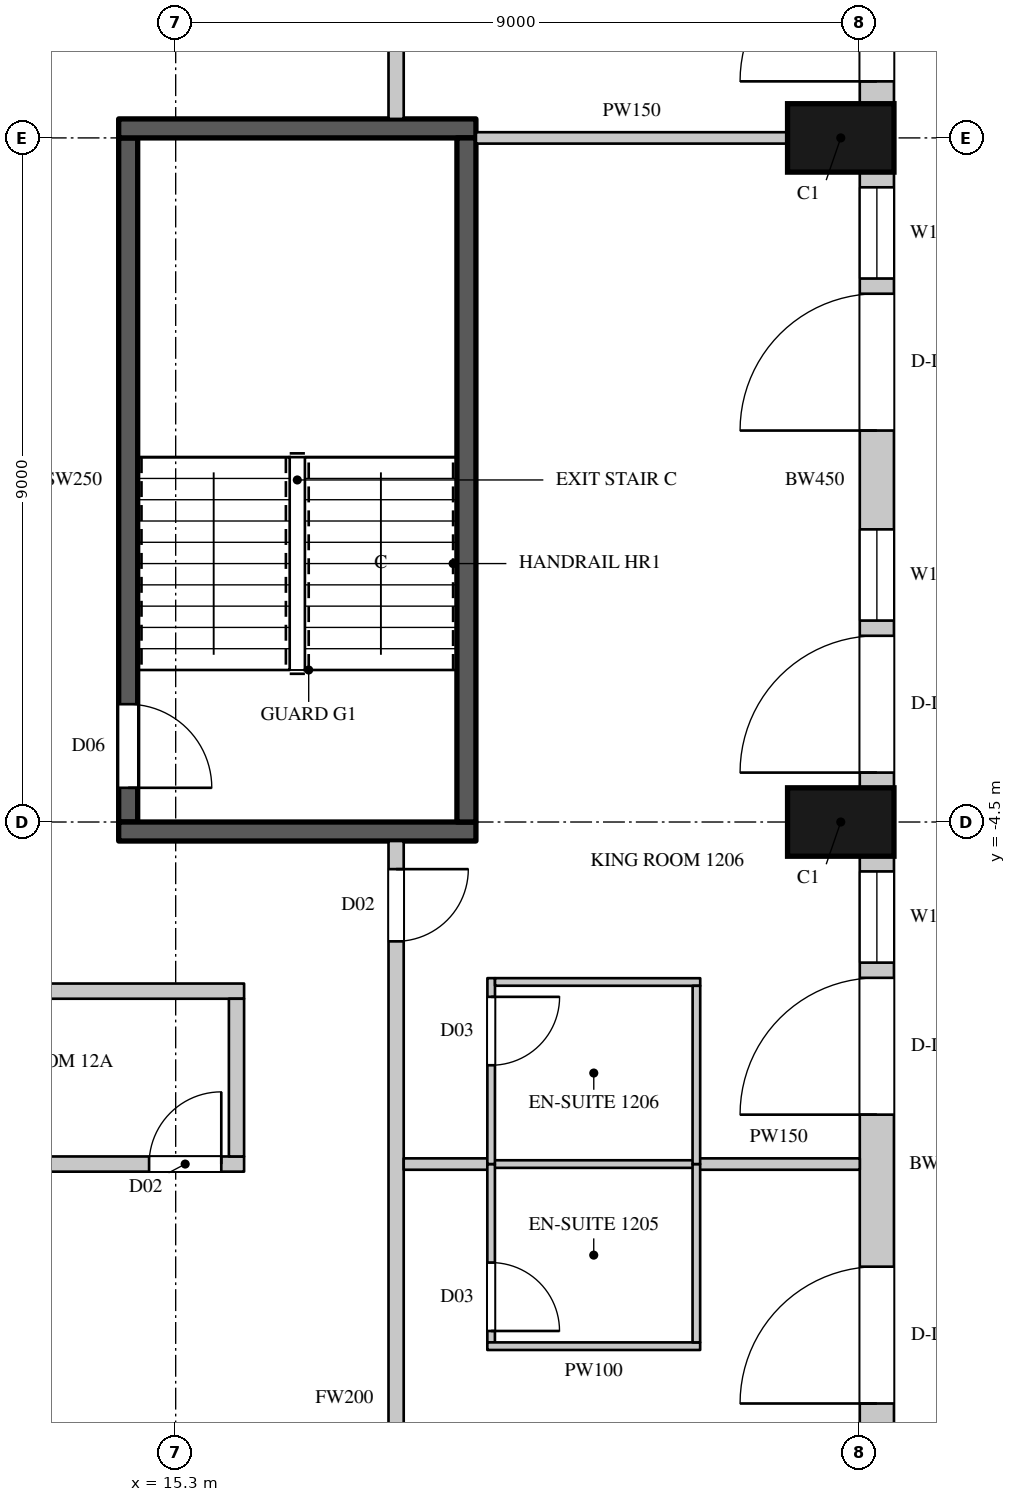
"""IFC4 building model, lengths in metres.
Left out: names, types, materials, properties, quantities, classifications, styles, units other than length and angle.
Written with IfcOpenShell. Run it as: python <this file> out.ifc"""

import sys

from ifc_helpers import new_model, si_unit, direction, frame, frame_2d, origin, origin_2d, place, context, subcontext, project, spatial, rectangle, extrude, element, fill, save


model = new_model("IFC4")
c1 = context("Model", 3, precision=1e-05, world=origin(), true_north=direction((0.0, 1.0)))
c2 = subcontext(c1, "Body", "Model", "MODEL_VIEW")
j1 = project(units=[si_unit("LENGTHUNIT", "METRE"), si_unit("PLANEANGLEUNIT", "RADIAN")], contexts=[c1])
p1 = place(None, origin())
s1 = spatial("IfcSite", under=j1, at=p1, CompositionType="ELEMENT")
p2 = place(p1, origin())
s2 = spatial("IfcBuilding", under=s1, at=p2, CompositionType="ELEMENT")
p3 = place(p2, frame((0.0, 0.0, 73.5)))
s3 = spatial("IfcBuildingStorey", under=s2, at=p3, CompositionType="ELEMENT", Elevation=73.5)
for number, where, z_axis, x_axis in (
    (1, (24.05, -4.5, 0.0), (0.0, 0.0, 1.0), (0.0, 1.0, 0.0)),
    (2, (24.05, 4.5, 0.0), (0.0, 0.0, 1.0), (0.0, 1.0, 0.0)),
):
    element("IfcColumn", number, at=place(p3, frame(where, z_axis=z_axis, x_axis=x_axis)), inside=s3, PredefinedType="COLUMN", context=c2, shape_type="SweptSolid", body=[
        extrude(rectangle(XDim=0.9, YDim=1.4, at=origin_2d()), origin(), (0.0, 0.0, 1.0), 3.6),
    ])
p4 = place(p3, frame((24.525, -13.05, 0.0), z_axis=(0.0, 0.0, 1.0), x_axis=(0.0, 1.0, 0.0)))
e3 = element("IfcWall", 3, at=p4, inside=s3, PredefinedType="SOLIDWALL", context=c2, shape_type="SweptSolid", body=[
    extrude(rectangle(XDim=8.1, YDim=0.45, at=frame_2d((4.05, 0.0))), origin(), (0.0, 0.0, 1.0), 3.3),
])
p5 = place(p4, frame((0.9, 0.0, 0.0)))
e4 = element("IfcOpeningElement", 4, at=p5, cuts=e3, PredefinedType="OPENING", context=c2, shape_type="SweptSolid", body=[
    extrude(rectangle(XDim=1.8, YDim=2.4, at=frame_2d((0.9, 1.2))), frame((0.0, 0.235, 0.0), z_axis=(0.0, -1.0, 0.0), x_axis=(1.0, 0.0, 0.0)), (0.0, 0.0, 1.0), 0.47),
])
p6 = place(p4, frame((4.7, 0.0, 0.0)))
e5 = element("IfcOpeningElement", 5, at=p6, cuts=e3, PredefinedType="OPENING", context=c2, shape_type="SweptSolid", body=[
    extrude(rectangle(XDim=1.8, YDim=2.4, at=frame_2d((0.9, 1.2))), frame((0.0, 0.235, 0.0), z_axis=(0.0, -1.0, 0.0), x_axis=(1.0, 0.0, 0.0)), (0.0, 0.0, 1.0), 0.47),
])
p7 = place(p4, frame((6.7, 0.0, 1.05)))
e6 = element("IfcOpeningElement", 6, at=p7, cuts=e3, PredefinedType="OPENING", context=c2, shape_type="SweptSolid", body=[
    extrude(rectangle(XDim=1.2, YDim=2.0, at=frame_2d((0.6, 1.0))), frame((0.0, 0.235, 0.0), z_axis=(0.0, -1.0, 0.0), x_axis=(1.0, 0.0, 0.0)), (0.0, 0.0, 1.0), 0.47),
])
p8 = place(p3, frame((24.525, -4.05, 0.0), z_axis=(0.0, 0.0, 1.0), x_axis=(0.0, 1.0, 0.0)))
e7 = element("IfcWall", 7, at=p8, inside=s3, PredefinedType="SOLIDWALL", context=c2, shape_type="SweptSolid", body=[
    extrude(rectangle(XDim=8.1, YDim=0.45, at=frame_2d((4.05, 0.0))), origin(), (0.0, 0.0, 1.0), 3.3),
])
p9 = place(p8, frame((0.2, 0.0, 0.0)))
e8 = element("IfcOpeningElement", 8, at=p9, cuts=e7, PredefinedType="OPENING", context=c2, shape_type="SweptSolid", body=[
    extrude(rectangle(XDim=1.8, YDim=2.4, at=frame_2d((0.9, 1.2))), frame((0.0, 0.235, 0.0), z_axis=(0.0, -1.0, 0.0), x_axis=(1.0, 0.0, 0.0)), (0.0, 0.0, 1.0), 0.47),
])
p10 = place(p8, frame((2.2, 0.0, 1.05)))
e9 = element("IfcOpeningElement", 9, at=p10, cuts=e7, PredefinedType="OPENING", context=c2, shape_type="SweptSolid", body=[
    extrude(rectangle(XDim=1.2, YDim=2.0, at=frame_2d((0.6, 1.0))), frame((0.0, 0.235, 0.0), z_axis=(0.0, -1.0, 0.0), x_axis=(1.0, 0.0, 0.0)), (0.0, 0.0, 1.0), 0.47),
])
p11 = place(p8, frame((4.7, 0.0, 0.0)))
e10 = element("IfcOpeningElement", 10, at=p11, cuts=e7, PredefinedType="OPENING", context=c2, shape_type="SweptSolid", body=[
    extrude(rectangle(XDim=1.8, YDim=2.4, at=frame_2d((0.9, 1.2))), frame((0.0, 0.235, 0.0), z_axis=(0.0, -1.0, 0.0), x_axis=(1.0, 0.0, 0.0)), (0.0, 0.0, 1.0), 0.47),
])
p12 = place(p8, frame((6.7, 0.0, 1.05)))
e11 = element("IfcOpeningElement", 11, at=p12, cuts=e7, PredefinedType="OPENING", context=c2, shape_type="SweptSolid", body=[
    extrude(rectangle(XDim=1.2, YDim=2.0, at=frame_2d((0.6, 1.0))), frame((0.0, 0.235, 0.0), z_axis=(0.0, -1.0, 0.0), x_axis=(1.0, 0.0, 0.0)), (0.0, 0.0, 1.0), 0.47),
])
p13 = place(p3, frame((24.525, 4.95, 0.0), z_axis=(0.0, 0.0, 1.0), x_axis=(0.0, 1.0, 0.0)))
e12 = element("IfcWall", 12, at=p13, inside=s3, PredefinedType="SOLIDWALL", context=c2, shape_type="SweptSolid", body=[
    extrude(rectangle(XDim=8.439, YDim=0.45, at=frame_2d((4.219, 0.0))), origin(), (0.0, 0.0, 1.0), 3.3),
])
p14 = place(p13, frame((0.294, 0.0, 0.0)))
e13 = element("IfcOpeningElement", 13, at=p14, cuts=e12, PredefinedType="OPENING", context=c2, shape_type="SweptSolid", body=[
    extrude(rectangle(XDim=1.8, YDim=2.4, at=frame_2d((0.9, 1.2))), frame((0.0, 0.235, 0.0), z_axis=(0.0, -1.0, 0.0), x_axis=(1.0, 0.0, 0.0)), (0.0, 0.0, 1.0), 0.47),
])
p15 = place(p13, frame((2.294, 0.0, 1.05)))
e14 = element("IfcOpeningElement", 14, at=p15, cuts=e12, PredefinedType="OPENING", context=c2, shape_type="SweptSolid", body=[
    extrude(rectangle(XDim=1.2, YDim=2.0, at=frame_2d((0.6, 1.0))), frame((0.0, 0.235, 0.0), z_axis=(0.0, -1.0, 0.0), x_axis=(1.0, 0.0, 0.0)), (0.0, 0.0, 1.0), 0.47),
])
p16 = place(p13, frame((5.232, 0.0, 1.05)))
e15 = element("IfcOpeningElement", 15, at=p16, cuts=e12, PredefinedType="OPENING", context=c2, shape_type="SweptSolid", body=[
    extrude(rectangle(XDim=2.7, YDim=2.0, at=frame_2d((1.35, 1.0))), frame((0.0, 0.235, 0.0), z_axis=(0.0, -1.0, 0.0), x_axis=(1.0, 0.0, 0.0)), (0.0, 0.0, 1.0), 0.47),
])
p17 = place(p3, frame((10.5, -9.0, 0.0), z_axis=(0.0, 0.0, 1.0), x_axis=(1.0, 0.0, 0.0)))
e16 = element("IfcWall", 16, at=p17, inside=s3, PredefinedType="PARTITIONING", context=c2, shape_type="SweptSolid", body=[
    extrude(rectangle(XDim=5.7, YDim=0.2, at=frame_2d((2.85, 0.0))), origin(), (0.0, 0.0, 1.0), 2.65),
])
p18 = place(p17, frame((4.45, 0.0, 0.0)))
e17 = element("IfcOpeningElement", 17, at=p18, cuts=e16, PredefinedType="OPENING", context=c2, shape_type="SweptSolid", body=[
    extrude(rectangle(XDim=0.95, YDim=2.2, at=frame_2d((0.475, 1.1))), frame((0.0, 0.11, 0.0), z_axis=(0.0, -1.0, 0.0), x_axis=(1.0, 0.0, 0.0)), (0.0, 0.0, 1.0), 0.22),
])
p19 = place(p3, frame((10.5, -6.725, 0.0), z_axis=(0.0, 0.0, 1.0), x_axis=(1.0, 0.0, 0.0)))
e18 = element("IfcWall", 18, at=p19, inside=s3, PredefinedType="PARTITIONING", context=c2, shape_type="SweptSolid", body=[
    extrude(rectangle(XDim=5.7, YDim=0.2, at=frame_2d((2.85, 0.0))), origin(), (0.0, 0.0, 1.0), 3.3),
])
p20 = place(p3, frame((16.1, -8.9, 0.0), z_axis=(0.0, 0.0, 1.0), x_axis=(0.0, 1.0, 0.0)))
e19 = element("IfcWall", 19, at=p20, inside=s3, PredefinedType="PARTITIONING", context=c2, shape_type="SweptSolid", body=[
    extrude(rectangle(XDim=2.075, YDim=0.2, at=frame_2d((1.038, 0.0))), origin(), (0.0, 0.0, 1.0), 3.3),
])
p21 = place(p3, frame((18.2, -19.42, 0.0), z_axis=(0.0, 0.0, 1.0), x_axis=(0.0, 1.0, 0.0)))
e20 = element("IfcWall", 20, at=p21, inside=s3, PredefinedType="PARTITIONING", context=c2, shape_type="SweptSolid", body=[
    extrude(rectangle(XDim=14.67, YDim=0.2, at=frame_2d((7.335, 0.0))), origin(), (0.0, 0.0, 1.0), 3.3),
])
p22 = place(p21, frame((3.95, 0.0, 0.0)))
e21 = element("IfcOpeningElement", 21, at=p22, cuts=e20, PredefinedType="OPENING", context=c2, shape_type="SweptSolid", body=[
    extrude(rectangle(XDim=0.95, YDim=2.2, at=frame_2d((0.475, 1.1))), frame((0.0, 0.11, 0.0), z_axis=(0.0, -1.0, 0.0), x_axis=(1.0, 0.0, 0.0)), (0.0, 0.0, 1.0), 0.22),
])
p23 = place(p21, frame((13.35, 0.0, 0.0)))
e22 = element("IfcOpeningElement", 22, at=p23, cuts=e20, PredefinedType="OPENING", context=c2, shape_type="SweptSolid", body=[
    extrude(rectangle(XDim=0.95, YDim=2.2, at=frame_2d((0.475, 1.1))), frame((0.0, 0.11, 0.0), z_axis=(0.0, -1.0, 0.0), x_axis=(1.0, 0.0, 0.0)), (0.0, 0.0, 1.0), 0.22),
])
p24 = place(p3, frame((18.2, 4.75, 0.0), z_axis=(0.0, 0.0, 1.0), x_axis=(0.0, 1.0, 0.0)))
e23 = element("IfcWall", 23, at=p24, inside=s3, PredefinedType="PARTITIONING", context=c2, shape_type="SweptSolid", body=[
    extrude(rectangle(XDim=14.134, YDim=0.2, at=frame_2d((7.067, 0.0))), origin(), (0.0, 0.0, 1.0), 3.3),
])
p25 = place(p24, frame((1.7, 0.0, 0.0)))
e24 = element("IfcOpeningElement", 24, at=p25, cuts=e23, PredefinedType="OPENING", context=c2, shape_type="SweptSolid", body=[
    extrude(rectangle(XDim=0.9, YDim=2.2, at=frame_2d((0.45, 1.1))), frame((0.0, 0.11, 0.0), z_axis=(0.0, -1.0, 0.0), x_axis=(1.0, 0.0, 0.0)), (0.0, 0.0, 1.0), 0.22),
])
p26 = place(p3, frame((18.3, -9.0, 0.0), z_axis=(0.0, 0.0, 1.0), x_axis=(1.0, 0.0, 0.0)))
e25 = element("IfcWall", 25, at=p26, inside=s3, PredefinedType="PARTITIONING", context=c2, shape_type="SweptSolid", body=[
    extrude(rectangle(XDim=1.13, YDim=0.15, at=frame_2d((0.565, 0.0))), origin(), (0.0, 0.0, 1.0), 2.65),
])
p27 = place(p3, frame((19.25, 4.5, 0.0), z_axis=(0.0, 0.0, 1.0), x_axis=(1.0, 0.0, 0.0)))
e26 = element("IfcWall", 26, at=p27, inside=s3, PredefinedType="PARTITIONING", context=c2, shape_type="SweptSolid", body=[
    extrude(rectangle(XDim=4.1, YDim=0.15, at=frame_2d((2.05, 0.0))), origin(), (0.0, 0.0, 1.0), 3.3),
])
p28 = place(p3, frame((22.17, -9.0, 0.0), z_axis=(0.0, 0.0, 1.0), x_axis=(1.0, 0.0, 0.0)))
e27 = element("IfcWall", 27, at=p28, inside=s3, PredefinedType="PARTITIONING", context=c2, shape_type="SweptSolid", body=[
    extrude(rectangle(XDim=2.13, YDim=0.15, at=frame_2d((1.065, 0.0))), origin(), (0.0, 0.0, 1.0), 2.65),
])
p29 = place(p3, frame((14.675, -4.5, 0.0), z_axis=(0.0, 0.0, 1.0), x_axis=(0.0, 1.0, 0.0)))
e28 = element("IfcWall", 28, at=p29, inside=s3, PredefinedType="SHEAR", context=c2, shape_type="SweptSolid", body=[
    extrude(rectangle(XDim=9.0, YDim=0.25, at=frame_2d((4.5, 0.0))), origin(), (0.0, 0.0, 1.0), 3.3),
])
p30 = place(p29, frame((0.45, 0.0, 0.0)))
e29 = element("IfcOpeningElement", 29, at=p30, cuts=e28, PredefinedType="OPENING", context=c2, shape_type="SweptSolid", body=[
    extrude(rectangle(XDim=1.1, YDim=2.2, at=frame_2d((0.55, 1.1))), frame((0.0, 0.135, 0.0), z_axis=(0.0, -1.0, 0.0), x_axis=(1.0, 0.0, 0.0)), (0.0, 0.0, 1.0), 0.27),
])
for number, where, z_axis, x_axis in (
    (30, (14.55, -4.625, 0.0), (0.0, 0.0, 1.0), (1.0, 0.0, 0.0)),
    (31, (14.55, 4.625, 0.0), (0.0, 0.0, 1.0), (1.0, 0.0, 0.0)),
):
    element("IfcWall", number, at=place(p3, frame(where, z_axis=z_axis, x_axis=x_axis)), inside=s3, PredefinedType="SHEAR", context=c2, shape_type="SweptSolid", body=[
        extrude(rectangle(XDim=4.7, YDim=0.25, at=frame_2d((2.35, 0.0))), origin(), (0.0, 0.0, 1.0), 3.3),
    ])
p31 = place(p3, frame((19.125, -4.5, 0.0), z_axis=(0.0, 0.0, 1.0), x_axis=(0.0, 1.0, 0.0)))
e32 = element("IfcWall", 32, at=p31, inside=s3, PredefinedType="SHEAR", context=c2, shape_type="SweptSolid", body=[
    extrude(rectangle(XDim=9.0, YDim=0.25, at=frame_2d((4.5, 0.0))), origin(), (0.0, 0.0, 1.0), 3.3),
])
p32 = place(p3, frame((19.43, -9.0, 0.0), z_axis=(0.0, 0.0, 1.0), x_axis=(1.0, 0.0, 0.0)))
e33 = element("IfcWall", 33, at=p32, inside=s3, PredefinedType="PARTITIONING", context=c2, shape_type="SweptSolid", body=[
    extrude(rectangle(XDim=2.74, YDim=0.1, at=frame_2d((1.37, 0.0))), origin(), (0.0, 0.0, 1.0), 2.65),
])
p33 = place(p3, frame((19.45, -11.346, 0.0), z_axis=(0.0, 0.0, 1.0), x_axis=(0.0, 1.0, 0.0)))
e34 = element("IfcWall", 34, at=p33, inside=s3, PredefinedType="PARTITIONING", context=c2, shape_type="SweptSolid", body=[
    extrude(rectangle(XDim=2.346, YDim=0.1, at=frame_2d((1.173, 0.0))), origin(), (0.0, 0.0, 1.0), 3.3),
])
p34 = place(p33, frame((0.15, 0.0, 0.0)))
e35 = element("IfcOpeningElement", 35, at=p34, cuts=e34, PredefinedType="OPENING", context=c2, shape_type="SweptSolid", body=[
    extrude(rectangle(XDim=0.9, YDim=2.2, at=frame_2d((0.45, 1.1))), frame((0.0, 0.06, 0.0), z_axis=(0.0, -1.0, 0.0), x_axis=(1.0, 0.0, 0.0)), (0.0, 0.0, 1.0), 0.12),
])
p35 = place(p3, frame((19.4, -11.396, 0.0), z_axis=(0.0, 0.0, 1.0), x_axis=(1.0, 0.0, 0.0)))
e36 = element("IfcWall", 36, at=p35, inside=s3, PredefinedType="PARTITIONING", context=c2, shape_type="SweptSolid", body=[
    extrude(rectangle(XDim=2.8, YDim=0.1, at=frame_2d((1.4, 0.0))), origin(), (0.0, 0.0, 1.0), 3.3),
])
p36 = place(p3, frame((19.45, -9.0, 0.0), z_axis=(0.0, 0.0, 1.0), x_axis=(0.000399241409, 0.999999920303, 0.0)))
e37 = element("IfcWall", 37, at=p36, inside=s3, PredefinedType="PARTITIONING", context=c2, shape_type="SweptSolid", body=[
    extrude(rectangle(XDim=2.446, YDim=0.1, at=frame_2d((1.223, 0.0))), origin(), (0.0, 0.0, 1.0), 3.3),
])
p37 = place(p36, frame((1.3, 0.0, 0.0)))
e38 = element("IfcOpeningElement", 38, at=p37, cuts=e37, PredefinedType="OPENING", context=c2, shape_type="SweptSolid", body=[
    extrude(rectangle(XDim=0.9, YDim=2.2, at=frame_2d((0.45, 1.1))), frame((0.0, 0.06, 0.0), z_axis=(0.0, -1.0, 0.0), x_axis=(1.0, 0.0, 0.0)), (0.0, 0.0, 1.0), 0.12),
])
p38 = place(p3, frame((19.501, -6.604, 0.0), z_axis=(0.0, 0.0, 1.0), x_axis=(0.999999934588, -0.000361696332, 0.0)))
e39 = element("IfcWall", 39, at=p38, inside=s3, PredefinedType="PARTITIONING", context=c2, shape_type="SweptSolid", body=[
    extrude(rectangle(XDim=2.7, YDim=0.1, at=frame_2d((1.35, 0.0))), origin(), (0.0, 0.0, 1.0), 3.3),
])
p39 = place(p3, frame((22.15, -11.346, 0.0), z_axis=(0.0, 0.0, 1.0), x_axis=(0.0, 1.0, 0.0)))
e40 = element("IfcWall", 40, at=p39, inside=s3, PredefinedType="PARTITIONING", context=c2, shape_type="SweptSolid", body=[
    extrude(rectangle(XDim=2.346, YDim=0.1, at=frame_2d((1.173, 0.0))), origin(), (0.0, 0.0, 1.0), 3.3),
])
p40 = place(p3, frame((22.15, -9.0, 0.0), z_axis=(0.0, 0.0, 1.0), x_axis=(0.00041644973, 0.999999913285, 0.0)))
e41 = element("IfcWall", 41, at=p40, inside=s3, PredefinedType="PARTITIONING", context=c2, shape_type="SweptSolid", body=[
    extrude(rectangle(XDim=2.345, YDim=0.1, at=frame_2d((1.172, 0.0))), origin(), (0.0, 0.0, 1.0), 3.3),
])
p41 = place(p5, origin())
e42 = element("IfcDoor", 42, at=p41, inside=s3, OperationType="SLIDING_TO_LEFT", PredefinedType="DOOR", context=c2, shape_type="SweptSolid", body=[
    extrude(rectangle(XDim=1.8, YDim=2.4, at=frame_2d((0.9, 1.2))), frame((0.0, 0.13, 0.0), z_axis=(0.0, -1.0, 0.0), x_axis=(1.0, 0.0, 0.0)), (0.0, 0.0, 1.0), 0.05),
])
fill(e4, e42)
p42 = place(p6, origin())
e43 = element("IfcDoor", 43, at=p42, inside=s3, OperationType="SLIDING_TO_LEFT", PredefinedType="DOOR", context=c2, shape_type="SweptSolid", body=[
    extrude(rectangle(XDim=1.8, YDim=2.4, at=frame_2d((0.9, 1.2))), frame((0.0, 0.13, 0.0), z_axis=(0.0, -1.0, 0.0), x_axis=(1.0, 0.0, 0.0)), (0.0, 0.0, 1.0), 0.05),
])
fill(e5, e43)
p43 = place(p7, origin())
e44 = element("IfcWindow", 44, at=p43, inside=s3, PartitioningType="SINGLE_PANEL", PredefinedType="WINDOW", context=c2, shape_type="SweptSolid", body=[
    extrude(rectangle(XDim=1.2, YDim=2.0, at=frame_2d((0.6, 1.0))), frame((0.0, 0.135, 0.0), z_axis=(0.0, -1.0, 0.0), x_axis=(1.0, 0.0, 0.0)), (0.0, 0.0, 1.0), 0.06),
])
fill(e6, e44)
p44 = place(p9, origin())
e45 = element("IfcDoor", 45, at=p44, inside=s3, OperationType="SLIDING_TO_LEFT", PredefinedType="DOOR", context=c2, shape_type="SweptSolid", body=[
    extrude(rectangle(XDim=1.8, YDim=2.4, at=frame_2d((0.9, 1.2))), frame((0.0, 0.13, 0.0), z_axis=(0.0, -1.0, 0.0), x_axis=(1.0, 0.0, 0.0)), (0.0, 0.0, 1.0), 0.05),
])
fill(e8, e45)
p45 = place(p10, origin())
e46 = element("IfcWindow", 46, at=p45, inside=s3, PartitioningType="SINGLE_PANEL", PredefinedType="WINDOW", context=c2, shape_type="SweptSolid", body=[
    extrude(rectangle(XDim=1.2, YDim=2.0, at=frame_2d((0.6, 1.0))), frame((0.0, 0.135, 0.0), z_axis=(0.0, -1.0, 0.0), x_axis=(1.0, 0.0, 0.0)), (0.0, 0.0, 1.0), 0.06),
])
fill(e9, e46)
p46 = place(p11, origin())
e47 = element("IfcDoor", 47, at=p46, inside=s3, OperationType="SLIDING_TO_LEFT", PredefinedType="DOOR", context=c2, shape_type="SweptSolid", body=[
    extrude(rectangle(XDim=1.8, YDim=2.4, at=frame_2d((0.9, 1.2))), frame((0.0, 0.13, 0.0), z_axis=(0.0, -1.0, 0.0), x_axis=(1.0, 0.0, 0.0)), (0.0, 0.0, 1.0), 0.05),
])
fill(e10, e47)
p47 = place(p12, origin())
e48 = element("IfcWindow", 48, at=p47, inside=s3, PartitioningType="SINGLE_PANEL", PredefinedType="WINDOW", context=c2, shape_type="SweptSolid", body=[
    extrude(rectangle(XDim=1.2, YDim=2.0, at=frame_2d((0.6, 1.0))), frame((0.0, 0.135, 0.0), z_axis=(0.0, -1.0, 0.0), x_axis=(1.0, 0.0, 0.0)), (0.0, 0.0, 1.0), 0.06),
])
fill(e11, e48)
p48 = place(p14, origin())
e49 = element("IfcDoor", 49, at=p48, inside=s3, OperationType="SLIDING_TO_LEFT", PredefinedType="DOOR", context=c2, shape_type="SweptSolid", body=[
    extrude(rectangle(XDim=1.8, YDim=2.4, at=frame_2d((0.9, 1.2))), frame((0.0, 0.13, 0.0), z_axis=(0.0, -1.0, 0.0), x_axis=(1.0, 0.0, 0.0)), (0.0, 0.0, 1.0), 0.05),
])
fill(e13, e49)
p49 = place(p18, origin())
e50 = element("IfcDoor", 50, at=p49, inside=s3, OperationType="SINGLE_SWING_RIGHT", PredefinedType="DOOR", context=c2, shape_type="SweptSolid", body=[
    extrude(rectangle(XDim=0.95, YDim=2.2, at=frame_2d((0.475, 1.1))), frame((0.0, 0.025, 0.0), z_axis=(0.0, -1.0, 0.0), x_axis=(1.0, 0.0, 0.0)), (0.0, 0.0, 1.0), 0.05),
])
fill(e17, e50)
p50 = place(p34, origin())
e51 = element("IfcDoor", 51, at=p50, inside=s3, OperationType="SINGLE_SWING_RIGHT", PredefinedType="DOOR", context=c2, shape_type="SweptSolid", body=[
    extrude(rectangle(XDim=0.9, YDim=2.2, at=frame_2d((0.45, 1.1))), frame((0.0, 0.025, 0.0), z_axis=(0.0, -1.0, 0.0), x_axis=(1.0, 0.0, 0.0)), (0.0, 0.0, 1.0), 0.05),
])
fill(e35, e51)
p51 = place(p23, origin())
e52 = element("IfcDoor", 52, at=p51, inside=s3, OperationType="SINGLE_SWING_LEFT", PredefinedType="DOOR", context=c2, shape_type="SweptSolid", body=[
    extrude(rectangle(XDim=0.95, YDim=2.2, at=frame_2d((0.475, 1.1))), frame((0.0, 0.025, 0.0), z_axis=(0.0, -1.0, 0.0), x_axis=(1.0, 0.0, 0.0)), (0.0, 0.0, 1.0), 0.05),
])
fill(e22, e52)
p52 = place(p37, origin())
e53 = element("IfcDoor", 53, at=p52, inside=s3, OperationType="SINGLE_SWING_LEFT", PredefinedType="DOOR", context=c2, shape_type="SweptSolid", body=[
    extrude(rectangle(XDim=0.9, YDim=2.2, at=frame_2d((0.45, 1.1))), frame((0.0, 0.025, 0.0), z_axis=(0.0, -1.0, 0.0), x_axis=(1.0, 0.0, 0.0)), (0.0, 0.0, 1.0), 0.05),
])
fill(e38, e53)
p53 = place(p30, origin())
e54 = element("IfcDoor", 54, at=p53, inside=s3, OperationType="SINGLE_SWING_RIGHT", PredefinedType="DOOR", context=c2, shape_type="SweptSolid", body=[
    extrude(rectangle(XDim=1.1, YDim=2.2, at=frame_2d((0.55, 1.1))), frame((0.0, 0.025, 0.0), z_axis=(0.0, -1.0, 0.0), x_axis=(1.0, 0.0, 0.0)), (0.0, 0.0, 1.0), 0.05),
])
fill(e29, e54)
save(model, sys.argv[1])
